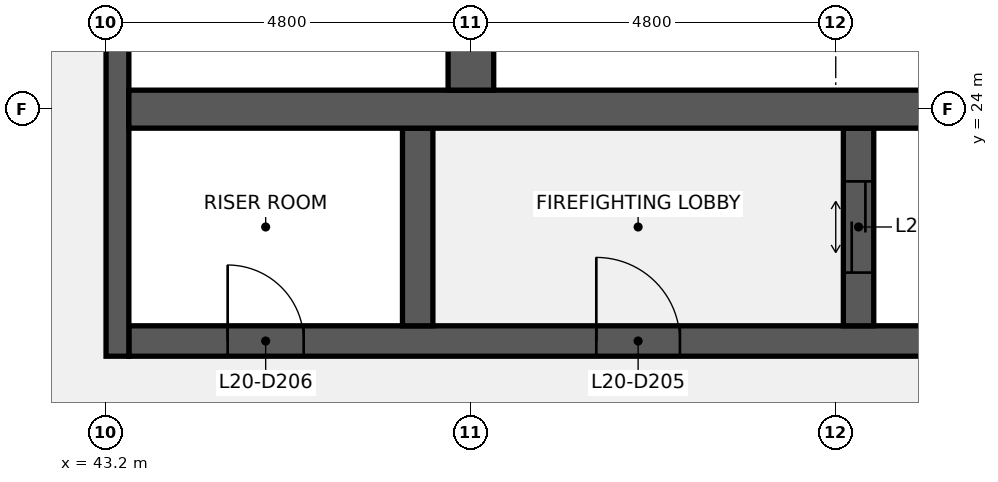
"""IFC4 building model, lengths in metres.
Left out: names, types, materials, properties, quantities, classifications, styles, units other than length and angle.
Written with IfcOpenShell. Run it as: python <this file> out.ifc"""

import sys

from ifc_helpers import new_model, si_unit, direction, frame, frame_2d, origin, place, context, subcontext, project, spatial, rectangle, extrude, element, fill, save


model = new_model("IFC4")
c1 = context("Model", 3, precision=1e-05, world=origin(), true_north=direction((0.0, 1.0)))
c2 = subcontext(c1, "Body", "Model", "MODEL_VIEW")
j1 = project(units=[si_unit("LENGTHUNIT", "METRE"), si_unit("PLANEANGLEUNIT", "RADIAN")], contexts=[c1])
p1 = place(None, origin())
s1 = spatial("IfcSite", under=j1, at=p1, CompositionType="ELEMENT")
p2 = place(p1, origin())
s2 = spatial("IfcBuilding", under=s1, at=p2, CompositionType="ELEMENT")
p3 = place(p2, frame((0.0, 0.0, 91.5)))
s3 = spatial("IfcBuildingStorey", under=s2, at=p3, CompositionType="ELEMENT", Elevation=91.5)
p4 = place(p3, frame((43.5, 20.95, 0.0), z_axis=(0.0, 0.0, 1.0), x_axis=(1.0, 0.0, 0.0)))
e1 = element("IfcWall", 1, at=p4, inside=s3, PredefinedType="SHEAR", context=c2, shape_type="SweptSolid", body=[
    extrude(rectangle(XDim=12.9, YDim=0.4, at=frame_2d((6.45, 0.0))), origin(), (0.0, 0.0, 1.0), 12.3),
])
p5 = place(p4, frame((6.15, 0.0, 0.0)))
e2 = element("IfcOpeningElement", 2, at=p5, cuts=e1, PredefinedType="OPENING", context=c2, shape_type="SweptSolid", body=[
    extrude(rectangle(XDim=1.1, YDim=2.1, at=frame_2d((0.55, 1.05))), frame((0.0, 0.21, 0.0), z_axis=(0.0, -1.0, 0.0), x_axis=(1.0, 0.0, 0.0)), (0.0, 0.0, 1.0), 0.42),
])
p6 = place(p4, frame((1.3, 0.0, 0.0)))
e3 = element("IfcOpeningElement", 3, at=p6, cuts=e1, PredefinedType="OPENING", context=c2, shape_type="SweptSolid", body=[
    extrude(rectangle(XDim=1.0, YDim=2.1, at=frame_2d((0.5, 1.05))), frame((0.0, 0.21, 0.0), z_axis=(0.0, -1.0, 0.0), x_axis=(1.0, 0.0, 0.0)), (0.0, 0.0, 1.0), 0.42),
])
p7 = place(p3, frame((43.35, 20.75, 0.0), z_axis=(0.0, 0.0, 1.0), x_axis=(0.0, 1.0, 0.0)))
e4 = element("IfcWall", 4, at=p7, inside=s3, PredefinedType="SHEAR", context=c2, shape_type="SweptSolid", body=[
    extrude(rectangle(XDim=6.5, YDim=0.3, at=frame_2d((3.25, 0.0))), origin(), (0.0, 0.0, 1.0), 12.3),
])
p8 = place(p3, frame((53.1, 21.15, 0.0), z_axis=(0.0, 0.0, 1.0), x_axis=(0.0, 1.0, 0.0)))
e5 = element("IfcWall", 5, at=p8, inside=s3, PredefinedType="SHEAR", context=c2, shape_type="SweptSolid", body=[
    extrude(rectangle(XDim=2.6, YDim=0.4, at=frame_2d((1.3, 0.0))), origin(), (0.0, 0.0, 1.0), 12.3),
])
p9 = place(p8, frame((0.7, 0.0, 0.0)))
e6 = element("IfcOpeningElement", 6, at=p9, cuts=e5, PredefinedType="OPENING", context=c2, shape_type="SweptSolid", body=[
    extrude(rectangle(XDim=1.2, YDim=2.1, at=frame_2d((0.6, 1.05))), frame((0.0, 0.21, 0.0), z_axis=(0.0, -1.0, 0.0), x_axis=(1.0, 0.0, 0.0)), (0.0, 0.0, 1.0), 0.42),
])
p10 = place(p3, frame((47.3, 21.15, 0.0), z_axis=(0.0, 0.0, 1.0), x_axis=(0.0, 1.0, 0.0)))
e7 = element("IfcWall", 7, at=p10, inside=s3, PredefinedType="SHEAR", context=c2, shape_type="SweptSolid", body=[
    extrude(rectangle(XDim=2.6, YDim=0.4, at=frame_2d((1.3, 0.0))), origin(), (0.0, 0.0, 1.0), 12.3),
])
p11 = place(p3, frame((43.5, 24.0, 0.0), z_axis=(0.0, 0.0, 1.0), x_axis=(1.0, 0.0, 0.0)))
e8 = element("IfcWall", 8, at=p11, inside=s3, PredefinedType="SHEAR", context=c2, shape_type="SweptSolid", body=[
    extrude(rectangle(XDim=12.9, YDim=0.5, at=frame_2d((6.45, 0.0))), origin(), (0.0, 0.0, 1.0), 12.3),
])
p12 = place(p3, frame((48.0, 24.25, 0.0), z_axis=(0.0, 0.0, 1.0), x_axis=(0.0, 1.0, 0.0)))
e9 = element("IfcWall", 9, at=p12, inside=s3, PredefinedType="SHEAR", context=c2, shape_type="SweptSolid", body=[
    extrude(rectangle(XDim=2.6, YDim=0.6, at=frame_2d((1.3, 0.0))), origin(), (0.0, 0.0, 1.0), 12.3),
])
p13 = place(p5, origin())
e10 = element("IfcDoor", 10, at=p13, inside=s3, OperationType="SINGLE_SWING_LEFT", PredefinedType="DOOR", context=c2, shape_type="SweptSolid", body=[
    extrude(rectangle(XDim=1.1, YDim=2.1, at=frame_2d((0.55, 1.05))), frame((0.0, 0.025, 0.0), z_axis=(0.0, -1.0, 0.0), x_axis=(1.0, 0.0, 0.0)), (0.0, 0.0, 1.0), 0.05),
])
fill(e2, e10)
p14 = place(p6, origin())
e11 = element("IfcDoor", 11, at=p14, inside=s3, OperationType="SINGLE_SWING_LEFT", PredefinedType="DOOR", context=c2, shape_type="SweptSolid", body=[
    extrude(rectangle(XDim=1.0, YDim=2.1, at=frame_2d((0.5, 1.05))), frame((0.0, 0.025, 0.0), z_axis=(0.0, -1.0, 0.0), x_axis=(1.0, 0.0, 0.0)), (0.0, 0.0, 1.0), 0.05),
])
fill(e3, e11)
p15 = place(p9, origin())
e12 = element("IfcDoor", 12, at=p15, inside=s3, OperationType="DOUBLE_DOOR_SLIDING", PredefinedType="DOOR", context=c2, shape_type="SweptSolid", body=[
    extrude(rectangle(XDim=1.2, YDim=2.1, at=frame_2d((0.6, 1.05))), frame((0.0, 0.025, 0.0), z_axis=(0.0, -1.0, 0.0), x_axis=(1.0, 0.0, 0.0)), (0.0, 0.0, 1.0), 0.05),
])
fill(e6, e12)
save(model, sys.argv[1])
